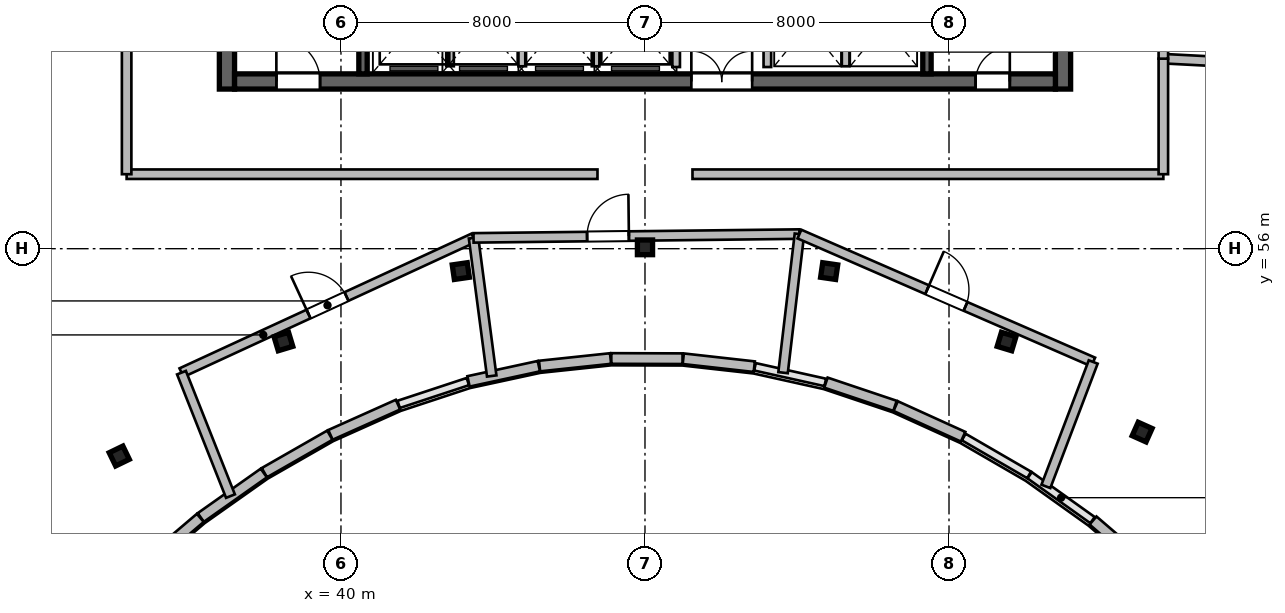
"""IFC4 building model, lengths in metres.
Left out: names, types, materials, properties, quantities, classifications, styles, units other than length and angle.
Written with IfcOpenShell. Run it as: python <this file> out.ifc"""

import sys

from ifc_helpers import new_model, si_unit, direction, frame, frame_2d, origin, origin_2d, place, context, subcontext, project, spatial, rectangle, i_section, extrude, source, transform, mapped, element, fill, save


model = new_model("IFC4")
c1 = context("Model", 3, precision=1e-05, world=origin(), true_north=direction((0.0, 1.0)))
c2 = subcontext(c1, "Body", "Model", "MODEL_VIEW")
j1 = project(units=[si_unit("LENGTHUNIT", "METRE"), si_unit("PLANEANGLEUNIT", "RADIAN")], contexts=[c1])
p1 = place(None, origin())
s1 = spatial("IfcSite", under=j1, at=p1, CompositionType="ELEMENT")
p2 = place(p1, origin())
s2 = spatial("IfcBuilding", under=s1, at=p2, CompositionType="ELEMENT")
p3 = place(p2, frame((0.0, 0.0, 267.9)))
s3 = spatial("IfcBuildingStorey", under=s2, at=p3, CompositionType="ELEMENT", Elevation=267.9)
m1 = source(origin(), c2, "Body", "SweptSolid", [
    extrude(rectangle(XDim=12.0, YDim=0.4, at=frame_2d((6.0, 0.0))), origin(), (0.0, 0.0, 1.0), 3.9),
])
for number, where, z_axis, x_axis in (
    (1, (37.0, 60.2, 0.0), (0.0, 0.0, 1.0), (0.0, 1.0, 0.0)),
    (2, (59.0, 60.2, 0.0), (0.0, 0.0, 1.0), (0.0, 1.0, 0.0)),
):
    element("IfcWall", number, at=place(p3, frame(where, z_axis=z_axis, x_axis=x_axis)), inside=s3, PredefinedType="SHEAR", context=c2, shape_type="MappedRepresentation", body=[
        mapped(m1, transform((0.0, 0.0, 0.0), scale=1.0)),
    ])
m2 = source(origin(), c2, "Body", "SweptSolid", [
    extrude(rectangle(XDim=21.6, YDim=0.4, at=frame_2d((10.8, 0.0))), origin(), (0.0, 0.0, 1.0), 3.9),
])
p4 = place(p3, frame((37.2, 60.4, 0.0), z_axis=(0.0, 0.0, 1.0), x_axis=(1.0, 0.0, 0.0)))
e3 = element("IfcWall", 3, at=p4, inside=s3, PredefinedType="SHEAR", context=c2, shape_type="MappedRepresentation", body=[
    mapped(m2, transform((0.0, 0.0, 0.0), scale=1.0)),
])
p5 = place(p4, frame((1.1, 0.0, 0.0)))
e4 = element("IfcOpeningElement", 4, at=p5, cuts=e3, PredefinedType="OPENING", context=c2, shape_type="SweptSolid", body=[
    extrude(rectangle(XDim=1.15, YDim=2.15, at=frame_2d((0.575, 1.075))), frame((0.0, 0.21, 0.0), z_axis=(0.0, -1.0, 0.0), x_axis=(1.0, 0.0, 0.0)), (0.0, 0.0, 1.0), 0.42),
])
p6 = place(p4, frame((19.5, 0.0, 0.0)))
e5 = element("IfcOpeningElement", 5, at=p6, cuts=e3, PredefinedType="OPENING", context=c2, shape_type="SweptSolid", body=[
    extrude(rectangle(XDim=0.9, YDim=2.1, at=frame_2d((0.45, 1.05))), frame((0.0, 0.21, 0.0), z_axis=(0.0, -1.0, 0.0), x_axis=(1.0, 0.0, 0.0)), (0.0, 0.0, 1.0), 0.42),
])
p7 = place(p4, frame((12.02, 0.0, 0.0)))
e6 = element("IfcOpeningElement", 6, at=p7, cuts=e3, PredefinedType="OPENING", context=c2, shape_type="SweptSolid", body=[
    extrude(rectangle(XDim=1.6, YDim=2.15, at=frame_2d((0.8, 1.075))), frame((0.0, 0.21, 0.0), z_axis=(0.0, -1.0, 0.0), x_axis=(1.0, 0.0, 0.0)), (0.0, 0.0, 1.0), 0.42),
])
m3 = source(origin(), c2, "Body", "SweptSolid", [
    extrude(rectangle(XDim=11.2, YDim=0.22, at=frame_2d((5.6, 0.0))), origin(), (0.0, 0.0, 1.0), 3.9),
])
p8 = place(p3, frame((40.58, 60.6, 0.0), z_axis=(0.0, 0.0, 1.0), x_axis=(0.0, 1.0, 0.0)))
e7 = element("IfcWall", 7, at=p8, inside=s3, PredefinedType="SHEAR", context=c2, shape_type="MappedRepresentation", body=[
    mapped(m3, transform((0.0, 0.0, 0.0), scale=1.0)),
])
p9 = place(p3, frame((55.42, 60.6, 0.0), z_axis=(0.0, 0.0, 1.0), x_axis=(0.0, 1.0, 0.0)))
e8 = element("IfcWall", 8, at=p9, inside=s3, PredefinedType="SHEAR", context=c2, shape_type="MappedRepresentation", body=[
    mapped(m3, transform((0.0, 0.0, 0.0), scale=1.0)),
])
p10 = place(p9, frame((9.645, 0.0, 0.0)))
e9 = element("IfcOpeningElement", 9, at=p10, cuts=e8, PredefinedType="OPENING", context=c2, shape_type="SweptSolid", body=[
    extrude(rectangle(XDim=1.15, YDim=2.15, at=frame_2d((0.575, 1.075))), frame((0.0, 0.12, 0.0), z_axis=(0.0, -1.0, 0.0), x_axis=(1.0, 0.0, 0.0)), (0.0, 0.0, 1.0), 0.24),
])
m4 = source(origin(), c2, "Body", "SweptSolid", [
    extrude(i_section(OverallWidth=0.399, OverallDepth=0.387, WebThickness=0.021, FlangeThickness=0.033, at=origin_2d()), origin(), (0.0, 0.0, 1.0), 3.9),
])
for number, where, z_axis, x_axis in (
    (10, (34.166, 50.545, 0.0), (0.0, 0.0, 1.0), (-0.436, 0.9, 0.0)),
    (11, (38.485, 53.558, 0.0), (0.0, 0.0, 1.0), (-0.289, 0.957, 0.0)),
    (12, (43.154, 55.411, 0.0), (0.0, 0.0, 1.0), (-0.143, 0.99, 0.0)),
    (13, (48.0, 56.036, 0.0), (0.0, 0.0, 1.0), (0.0, 1.0, 0.0)),
    (14, (52.846, 55.411, 0.0), (0.0, 0.0, 1.0), (0.143, 0.99, 0.0)),
    (15, (57.515, 53.558, 0.0), (0.0, 0.0, 1.0), (0.289, 0.957, 0.0)),
    (16, (61.082, 51.175, 0.0), (0.0, 0.0, 1.0), (0.409, 0.912, 0.0)),
):
    element("IfcColumn", number, at=place(p3, frame(where, z_axis=z_axis, x_axis=x_axis)), inside=s3, PredefinedType="COLUMN", context=c2, shape_type="MappedRepresentation", body=[
        mapped(m4, transform((0.0, 0.0, 0.0), scale=1.0)),
    ])
m5 = source(origin(), c2, "Body", "SweptSolid", [
    extrude(rectangle(XDim=2.04, YDim=0.28, at=frame_2d((1.02, 0.0))), origin(), (0.0, 0.0, 1.0), 3.65),
])
p11 = place(p3, frame((61.337, 47.519, 0.0), z_axis=(0.0, 0.0, 1.0), x_axis=(-0.758402847119, 0.651786101019, 0.0)))
e17 = element("IfcWall", 17, at=p11, inside=s3, PredefinedType="SOLIDWALL", context=c2, shape_type="MappedRepresentation", body=[
    mapped(m5, transform((0.0, 0.0, 0.0), scale=1.0)),
])
m6 = source(origin(), c2, "Body", "SweptSolid", [
    extrude(rectangle(XDim=1.95, YDim=0.28, at=frame_2d((0.975, 0.0))), origin(), (0.0, 0.0, 1.0), 3.65),
])
p12 = place(p3, frame((56.372, 51.052, 0.0), z_axis=(0.0, 0.0, 1.0), x_axis=(-0.910507945155, 0.413491574048, 0.0)))
e18 = element("IfcWall", 18, at=p12, inside=s3, PredefinedType="SOLIDWALL", context=c2, shape_type="MappedRepresentation", body=[
    mapped(m6, transform((0.0, 0.0, 0.0), scale=1.0)),
])
m7 = source(origin(), c2, "Body", "SweptSolid", [
    extrude(rectangle(XDim=1.918, YDim=0.28, at=frame_2d((0.959, 0.0))), origin(), (0.0, 0.0, 1.0), 3.65),
])
p13 = place(p3, frame((54.579, 51.865, 0.0), z_axis=(0.0, 0.0, 1.0), x_axis=(-0.947916697588, 0.318518342381, 0.0)))
e19 = element("IfcWall", 19, at=p13, inside=s3, PredefinedType="SOLIDWALL", context=c2, shape_type="MappedRepresentation", body=[
    mapped(m7, transform((0.0, 0.0, 0.0), scale=1.0)),
])
m8 = source(origin(), c2, "Body", "SweptSolid", [
    extrude(rectangle(XDim=1.879, YDim=0.28, at=frame_2d((0.94, 0.0))), origin(), (0.0, 0.0, 1.0), 3.65),
])
p14 = place(p3, frame((50.875, 52.896, 0.0), z_axis=(0.0, 0.0, 1.0), x_axis=(-0.993797887127, 0.111201436782, 0.0)))
e20 = element("IfcWall", 20, at=p14, inside=s3, PredefinedType="SOLIDWALL", context=c2, shape_type="MappedRepresentation", body=[
    mapped(m8, transform((0.0, 0.0, 0.0), scale=1.0)),
])
m9 = source(origin(), c2, "Body", "SweptSolid", [
    extrude(rectangle(XDim=1.874, YDim=0.28, at=frame_2d((0.937, 0.0))), origin(), (0.0, 0.0, 1.0), 3.65),
])
p15 = place(p3, frame((48.988, 53.106, 0.0), z_axis=(0.0, 0.0, 1.0), x_axis=(-0.999995893899, 0.002865690982, 0.0)))
e21 = element("IfcWall", 21, at=p15, inside=s3, PredefinedType="SOLIDWALL", context=c2, shape_type="MappedRepresentation", body=[
    mapped(m9, transform((0.0, 0.0, 0.0), scale=1.0)),
])
m10 = source(origin(), c2, "Body", "SweptSolid", [
    extrude(rectangle(XDim=1.879, YDim=0.28, at=frame_2d((0.939, 0.0))), origin(), (0.0, 0.0, 1.0), 3.65),
])
p16 = place(p3, frame((47.094, 53.11, 0.0), z_axis=(0.0, 0.0, 1.0), x_axis=(-0.994431872813, -0.105381451568, 0.0)))
e22 = element("IfcWall", 22, at=p16, inside=s3, PredefinedType="SOLIDWALL", context=c2, shape_type="MappedRepresentation", body=[
    mapped(m10, transform((0.0, 0.0, 0.0), scale=1.0)),
])
m11 = source(origin(), c2, "Body", "SweptSolid", [
    extrude(rectangle(XDim=1.893, YDim=0.28, at=frame_2d((0.947, 0.0))), origin(), (0.0, 0.0, 1.0), 3.65),
])
p17 = place(p3, frame((45.207, 52.909, 0.0), z_axis=(0.0, 0.0, 1.0), x_axis=(-0.977379595344, -0.21149261596, 0.0)))
e23 = element("IfcWall", 23, at=p17, inside=s3, PredefinedType="SOLIDWALL", context=c2, shape_type="MappedRepresentation", body=[
    mapped(m11, transform((0.0, 0.0, 0.0), scale=1.0)),
])
m12 = source(origin(), c2, "Body", "SweptSolid", [
    extrude(rectangle(XDim=1.948, YDim=0.28, at=frame_2d((0.974, 0.0))), origin(), (0.0, 0.0, 1.0), 3.65),
])
p18 = place(p3, frame((41.501, 51.897, 0.0), z_axis=(0.0, 0.0, 1.0), x_axis=(-0.912712483043, -0.408602402461, 0.0)))
e24 = element("IfcWall", 24, at=p18, inside=s3, PredefinedType="SOLIDWALL", context=c2, shape_type="MappedRepresentation", body=[
    mapped(m12, transform((0.0, 0.0, 0.0), scale=1.0)),
])
m13 = source(origin(), c2, "Body", "SweptSolid", [
    extrude(rectangle(XDim=1.986, YDim=0.28, at=frame_2d((0.993, 0.0))), origin(), (0.0, 0.0, 1.0), 3.65),
])
p19 = place(p3, frame((39.708, 51.093, 0.0), z_axis=(0.0, 0.0, 1.0), x_axis=(-0.867940364671, -0.496668423976, 0.0)))
e25 = element("IfcWall", 25, at=p19, inside=s3, PredefinedType="SOLIDWALL", context=c2, shape_type="MappedRepresentation", body=[
    mapped(m13, transform((0.0, 0.0, 0.0), scale=1.0)),
])
m14 = source(origin(), c2, "Body", "SweptSolid", [
    extrude(rectangle(XDim=2.03, YDim=0.28, at=frame_2d((1.015, 0.0))), origin(), (0.0, 0.0, 1.0), 3.65),
])
p20 = place(p3, frame((37.969, 50.097, 0.0), z_axis=(0.0, 0.0, 1.0), x_axis=(-0.816987864272, -0.576654861796, 0.0)))
e26 = element("IfcWall", 26, at=p20, inside=s3, PredefinedType="SOLIDWALL", context=c2, shape_type="MappedRepresentation", body=[
    mapped(m14, transform((0.0, 0.0, 0.0), scale=1.0)),
])
m15 = source(origin(), c2, "Body", "SweptSolid", [
    extrude(rectangle(XDim=2.078, YDim=0.28, at=frame_2d((1.039, 0.0))), origin(), (0.0, 0.0, 1.0), 3.65),
])
p21 = place(p3, frame((36.298, 48.917, 0.0), z_axis=(0.0, 0.0, 1.0), x_axis=(-0.761475215802, -0.648194026291, 0.0)))
e27 = element("IfcWall", 27, at=p21, inside=s3, PredefinedType="SOLIDWALL", context=c2, shape_type="MappedRepresentation", body=[
    mapped(m15, transform((0.0, 0.0, 0.0), scale=1.0)),
])
m16 = source(origin(), c2, "Body", "SweptSolid", [
    extrude(rectangle(XDim=2.24, YDim=0.2, at=frame_2d((1.12, 0.0))), origin(), (0.0, 0.0, 1.0), 3.65),
])
for number, where, z_axis, x_axis in (
    (28, (48.82, 60.78, 0.0), (0.0, 0.0, 1.0), (0.0, 1.0, 0.0)),
    (29, (51.22, 60.78, 0.0), (0.0, 0.0, 1.0), (0.0, 1.0, 0.0)),
):
    element("IfcWall", number, at=place(p3, frame(where, z_axis=z_axis, x_axis=x_axis)), inside=s3, PredefinedType="SOLIDWALL", context=c2, shape_type="MappedRepresentation", body=[
        mapped(m16, transform((0.0, 0.0, 0.0), scale=1.0)),
    ])
m17 = source(origin(), c2, "Body", "SweptSolid", [
    extrude(rectangle(XDim=2.2, YDim=0.2, at=frame_2d((1.1, 0.0))), origin(), (0.0, 0.0, 1.0), 3.65),
])
for number, where, z_axis, x_axis in (
    (30, (42.87, 60.8, 0.0), (0.0, 0.0, 1.0), (0.0, 1.0, 0.0)),
    (31, (44.77, 60.8, 0.0), (0.0, 0.0, 1.0), (0.0, 1.0, 0.0)),
    (32, (46.7, 60.8, 0.0), (0.0, 0.0, 1.0), (0.0, 1.0, 0.0)),
    (33, (53.28, 60.8, 0.0), (0.0, 0.0, 1.0), (0.0, 1.0, 0.0)),
):
    element("IfcWall", number, at=place(p3, frame(where, z_axis=z_axis, x_axis=x_axis)), inside=s3, PredefinedType="SOLIDWALL", context=c2, shape_type="MappedRepresentation", body=[
        mapped(m17, transform((0.0, 0.0, 0.0), scale=1.0)),
    ])
m18 = source(origin(), c2, "Body", "SweptSolid", [
    extrude(rectangle(XDim=8.464, YDim=0.25, at=frame_2d((4.232, 0.0))), origin(), (0.0, 0.0, 1.0), 3.65),
])
p22 = place(p3, frame((35.803, 52.738, 0.0), z_axis=(0.0, 0.0, 1.0), x_axis=(0.90801678306, 0.418933791524, 0.0)))
e34 = element("IfcWall", 34, at=p22, inside=s3, PredefinedType="PARTITIONING", context=c2, shape_type="MappedRepresentation", body=[
    mapped(m18, transform((0.0, 0.0, 0.0), scale=1.0)),
])
p23 = place(p22, frame((3.682, 0.0, 0.0)))
e35 = element("IfcOpeningElement", 35, at=p23, cuts=e34, PredefinedType="OPENING", context=c2, shape_type="SweptSolid", body=[
    extrude(rectangle(XDim=1.1, YDim=2.15, at=frame_2d((0.55, 1.075))), frame((0.0, 0.135, 0.0), z_axis=(0.0, -1.0, 0.0), x_axis=(1.0, 0.0, 0.0)), (0.0, 0.0, 1.0), 0.27),
])
m19 = source(origin(), c2, "Body", "SweptSolid", [
    extrude(rectangle(XDim=3.495, YDim=0.25, at=frame_2d((1.747, 0.0))), origin(), (0.0, 0.0, 1.0), 3.65),
])
p24 = place(p3, frame((37.092, 49.49, 0.0), z_axis=(0.0, 0.0, 1.0), x_axis=(-0.368859890644, 0.929485008526, 0.0)))
e36 = element("IfcWall", 36, at=p24, inside=s3, PredefinedType="PARTITIONING", context=c2, shape_type="MappedRepresentation", body=[
    mapped(m19, transform((0.0, 0.0, 0.0), scale=1.0)),
])
m20 = source(origin(), c2, "Body", "SweptSolid", [
    extrude(rectangle(XDim=3.665, YDim=0.25, at=frame_2d((1.832, 0.0))), origin(), (0.0, 0.0, 1.0), 3.65),
])
p25 = place(p3, frame((43.967, 52.651, 0.0), z_axis=(0.0, 0.0, 1.0), x_axis=(-0.130509659129, 0.991447037856, 0.0)))
e37 = element("IfcWall", 37, at=p25, inside=s3, PredefinedType="PARTITIONING", context=c2, shape_type="MappedRepresentation", body=[
    mapped(m20, transform((0.0, 0.0, 0.0), scale=1.0)),
])
m21 = source(origin(), c2, "Body", "SweptSolid", [
    extrude(rectangle(XDim=8.576, YDim=0.25, at=frame_2d((4.288, 0.0))), origin(), (0.0, 0.0, 1.0), 3.65),
])
p26 = place(p3, frame((43.489, 56.284, 0.0), z_axis=(0.0, 0.0, 1.0), x_axis=(0.999931553434, 0.011699933624, 0.0)))
e38 = element("IfcWall", 38, at=p26, inside=s3, PredefinedType="PARTITIONING", context=c2, shape_type="MappedRepresentation", body=[
    mapped(m21, transform((0.0, 0.0, 0.0), scale=1.0)),
])
p27 = place(p26, frame((2.988, 0.0, 0.0)))
e39 = element("IfcOpeningElement", 39, at=p27, cuts=e38, PredefinedType="OPENING", context=c2, shape_type="SweptSolid", body=[
    extrude(rectangle(XDim=1.1, YDim=2.15, at=frame_2d((0.55, 1.075))), frame((0.0, 0.135, 0.0), z_axis=(0.0, -1.0, 0.0), x_axis=(1.0, 0.0, 0.0)), (0.0, 0.0, 1.0), 0.27),
])
m22 = source(origin(), c2, "Body", "SweptSolid", [
    extrude(rectangle(XDim=3.672, YDim=0.25, at=frame_2d((1.836, 0.0))), origin(), (0.0, 0.0, 1.0), 3.65),
])
p28 = place(p3, frame((51.633, 52.738, 0.0), z_axis=(0.0, 0.0, 1.0), x_axis=(0.117362064027, 0.993089193339, 0.0)))
e40 = element("IfcWall", 40, at=p28, inside=s3, PredefinedType="PARTITIONING", context=c2, shape_type="MappedRepresentation", body=[
    mapped(m22, transform((0.0, 0.0, 0.0), scale=1.0)),
])
m23 = source(origin(), c2, "Body", "SweptSolid", [
    extrude(rectangle(XDim=8.431, YDim=0.25, at=frame_2d((4.216, 0.0))), origin(), (0.0, 0.0, 1.0), 3.65),
])
p29 = place(p3, frame((52.064, 56.385, 0.0), z_axis=(0.0, 0.0, 1.0), x_axis=(0.916868304583, -0.399189819574, 0.0)))
e41 = element("IfcWall", 41, at=p29, inside=s3, PredefinedType="PARTITIONING", context=c2, shape_type="MappedRepresentation", body=[
    mapped(m23, transform((0.0, 0.0, 0.0), scale=1.0)),
])
p30 = place(p29, frame((3.666, 0.0, 0.0)))
e42 = element("IfcOpeningElement", 42, at=p30, cuts=e41, PredefinedType="OPENING", context=c2, shape_type="SweptSolid", body=[
    extrude(rectangle(XDim=1.1, YDim=2.15, at=frame_2d((0.55, 1.075))), frame((0.0, 0.135, 0.0), z_axis=(0.0, -1.0, 0.0), x_axis=(1.0, 0.0, 0.0)), (0.0, 0.0, 1.0), 0.27),
])
m24 = source(origin(), c2, "Body", "SweptSolid", [
    extrude(rectangle(XDim=3.502, YDim=0.25, at=frame_2d((1.751, 0.0))), origin(), (0.0, 0.0, 1.0), 3.65),
])
p31 = place(p3, frame((58.55, 49.746, 0.0), z_axis=(0.0, 0.0, 1.0), x_axis=(0.35542122772, 0.934706237749, 0.0)))
e43 = element("IfcWall", 43, at=p31, inside=s3, PredefinedType="PARTITIONING", context=c2, shape_type="MappedRepresentation", body=[
    mapped(m24, transform((0.0, 0.0, 0.0), scale=1.0)),
])
m25 = source(origin(), c2, "Body", "SweptSolid", [
    extrude(rectangle(XDim=12.39, YDim=0.25, at=frame_2d((6.195, 0.0))), origin(), (0.0, 0.0, 1.0), 3.65),
])
for number, where, z_axis, x_axis in (
    (44, (34.36, 57.96, 0.0), (0.0, 0.0, 1.0), (1.0, 0.0, 0.0)),
    (45, (49.25, 57.96, 0.0), (0.0, 0.0, 1.0), (1.0, 0.0, 0.0)),
):
    element("IfcWall", number, at=place(p3, frame(where, z_axis=z_axis, x_axis=x_axis)), inside=s3, PredefinedType="PARTITIONING", context=c2, shape_type="MappedRepresentation", body=[
        mapped(m25, transform((0.0, 0.0, 0.0), scale=1.0)),
    ])
m26 = source(origin(), c2, "Body", "SweptSolid", [
    extrude(rectangle(XDim=4.04, YDim=0.25, at=frame_2d((2.02, 0.0))), origin(), (0.0, 0.0, 1.0), 3.65),
])
p32 = place(p3, frame((34.36, 57.96, 0.0), z_axis=(0.0, 0.0, 1.0), x_axis=(0.0, 1.0, 0.0)))
e46 = element("IfcWall", 46, at=p32, inside=s3, PredefinedType="PARTITIONING", context=c2, shape_type="MappedRepresentation", body=[
    mapped(m26, transform((0.0, 0.0, 0.0), scale=1.0)),
])
m27 = source(origin(), c2, "Body", "SweptSolid", [
    extrude(rectangle(XDim=12.938, YDim=0.25, at=frame_2d((6.469, 0.0))), origin(), (0.0, 0.0, 1.0), 3.65),
])
p33 = place(p3, frame((61.64, 61.0, 0.0), z_axis=(0.0, 0.0, 1.0), x_axis=(0.998643821866, -0.052062626215, 0.0)))
e47 = element("IfcWall", 47, at=p33, inside=s3, PredefinedType="PARTITIONING", context=c2, shape_type="MappedRepresentation", body=[
    mapped(m27, transform((0.0, 0.0, 0.0), scale=1.0)),
])
m28 = source(origin(), c2, "Body", "SweptSolid", [
    extrude(rectangle(XDim=3.04, YDim=0.25, at=frame_2d((1.52, 0.0))), origin(), (0.0, 0.0, 1.0), 3.65),
])
p34 = place(p3, frame((61.64, 57.96, 0.0), z_axis=(0.0, 0.0, 1.0), x_axis=(0.0, 1.0, 0.0)))
e48 = element("IfcWall", 48, at=p34, inside=s3, PredefinedType="PARTITIONING", context=c2, shape_type="MappedRepresentation", body=[
    mapped(m28, transform((0.0, 0.0, 0.0), scale=1.0)),
])
m29 = source(origin(), c2, "Body", "SweptSolid", [
    extrude(rectangle(XDim=3.8, YDim=0.25, at=frame_2d((1.9, 0.0))), origin(), (0.0, 0.0, 1.0), 3.65),
])
p35 = place(p3, frame((61.64, 61.0, 0.0), z_axis=(0.0, 0.0, 1.0), x_axis=(0.0, 1.0, 0.0)))
e49 = element("IfcWall", 49, at=p35, inside=s3, PredefinedType="PARTITIONING", context=c2, shape_type="MappedRepresentation", body=[
    mapped(m29, transform((0.0, 0.0, 0.0), scale=1.0)),
])
p36 = place(p35, frame((0.969, 0.0, 0.0)))
e50 = element("IfcOpeningElement", 50, at=p36, cuts=e49, PredefinedType="OPENING", context=c2, shape_type="SweptSolid", body=[
    extrude(rectangle(XDim=0.95, YDim=2.1, at=frame_2d((0.475, 1.05))), frame((0.0, 0.135, 0.0), z_axis=(0.0, -1.0, 0.0), x_axis=(1.0, 0.0, 0.0)), (0.0, 0.0, 1.0), 0.27),
])
m30 = source(origin(), c2, "Body", "SweptSolid", [
    extrude(rectangle(XDim=1.15, YDim=2.15, at=frame_2d((0.575, 1.075))), frame((0.0, 0.025, 0.0), z_axis=(0.0, -1.0, 0.0), x_axis=(1.0, 0.0, 0.0)), (0.0, 0.0, 1.0), 0.05),
])
p37 = place(p5, origin())
e51 = element("IfcDoor", 51, at=p37, inside=s3, OperationType="SINGLE_SWING_LEFT", PredefinedType="DOOR", context=c2, shape_type="MappedRepresentation", body=[
    mapped(m30, transform((0.0, 0.0, 0.0), scale=1.0)),
])
fill(e4, e51)
m31 = source(origin(), c2, "Body", "SweptSolid", [
    extrude(rectangle(XDim=0.9, YDim=2.1, at=frame_2d((0.45, 1.05))), frame((0.0, 0.025, 0.0), z_axis=(0.0, -1.0, 0.0), x_axis=(1.0, 0.0, 0.0)), (0.0, 0.0, 1.0), 0.05),
])
p38 = place(p6, origin())
e52 = element("IfcDoor", 52, at=p38, inside=s3, OperationType="SINGLE_SWING_RIGHT", PredefinedType="DOOR", context=c2, shape_type="MappedRepresentation", body=[
    mapped(m31, transform((0.0, 0.0, 0.0), scale=1.0)),
])
fill(e5, e52)
m32 = source(origin(), c2, "Body", "SweptSolid", [
    extrude(rectangle(XDim=1.6, YDim=2.15, at=frame_2d((0.8, 1.075))), frame((0.0, 0.025, 0.0), z_axis=(0.0, -1.0, 0.0), x_axis=(1.0, 0.0, 0.0)), (0.0, 0.0, 1.0), 0.05),
])
p39 = place(p7, origin())
e53 = element("IfcDoor", 53, at=p39, inside=s3, OperationType="DOUBLE_DOOR_SINGLE_SWING", PredefinedType="DOOR", context=c2, shape_type="MappedRepresentation", body=[
    mapped(m32, transform((0.0, 0.0, 0.0), scale=1.0)),
])
fill(e6, e53)
m33 = source(origin(), c2, "Body", "SweptSolid", [
    extrude(rectangle(XDim=1.1, YDim=2.15, at=frame_2d((0.55, 1.075))), frame((0.0, 0.025, 0.0), z_axis=(0.0, -1.0, 0.0), x_axis=(1.0, 0.0, 0.0)), (0.0, 0.0, 1.0), 0.05),
])
p40 = place(p23, origin())
e54 = element("IfcDoor", 54, at=p40, inside=s3, OperationType="SINGLE_SWING_LEFT", PredefinedType="DOOR", context=c2, shape_type="MappedRepresentation", body=[
    mapped(m33, transform((0.0, 0.0, 0.0), scale=1.0)),
])
fill(e35, e54)
p41 = place(p27, origin())
e55 = element("IfcDoor", 55, at=p41, inside=s3, OperationType="SINGLE_SWING_RIGHT", PredefinedType="DOOR", context=c2, shape_type="MappedRepresentation", body=[
    mapped(m33, transform((0.0, 0.0, 0.0), scale=1.0)),
])
fill(e39, e55)
p42 = place(p30, origin())
e56 = element("IfcDoor", 56, at=p42, inside=s3, OperationType="SINGLE_SWING_LEFT", PredefinedType="DOOR", context=c2, shape_type="MappedRepresentation", body=[
    mapped(m33, transform((0.0, 0.0, 0.0), scale=1.0)),
])
fill(e42, e56)
save(model, sys.argv[1])
